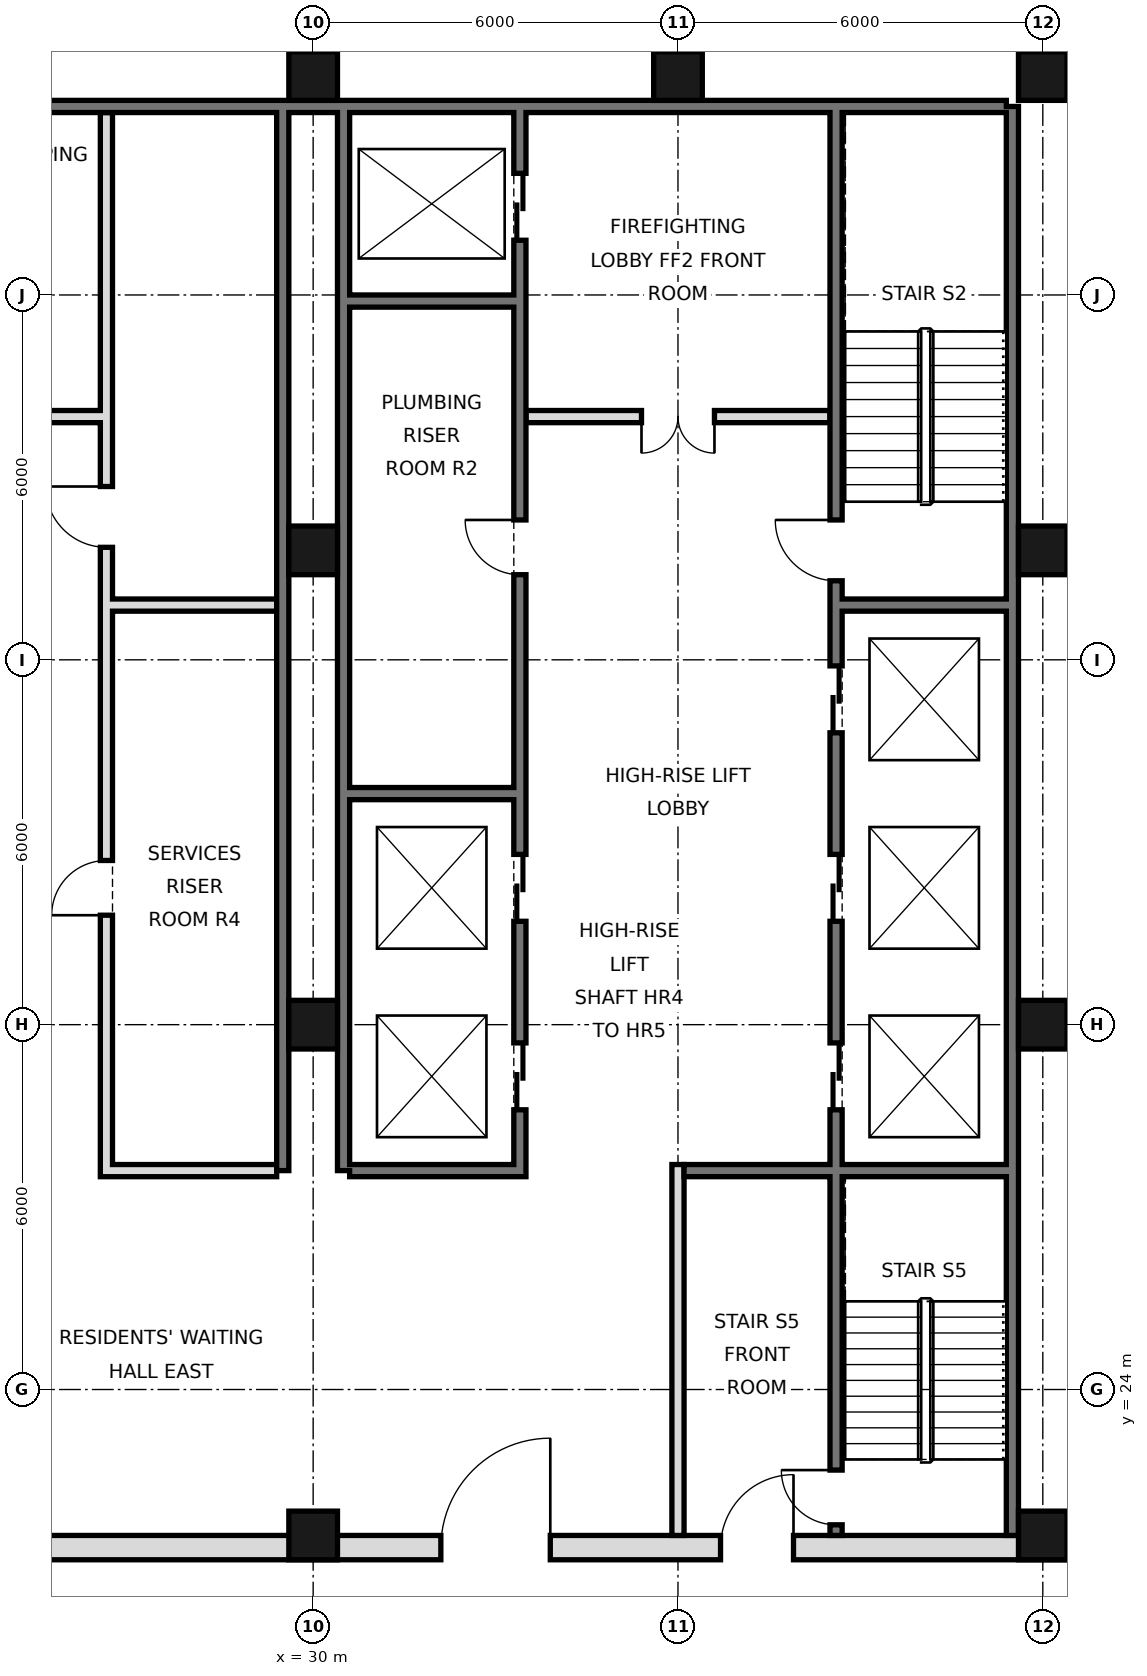
"""IFC4 building model, lengths in metres.
Left out: names, types, materials, properties, quantities, classifications, styles, units other than length and angle.
Written with IfcOpenShell. Run it as: python <this file> out.ifc"""

import sys

from ifc_helpers import new_model, si_unit, direction, frame, frame_2d, origin, origin_2d, place, context, subcontext, project, spatial, rectangle, hollow_rectangle, extrude, element, fill, save


model = new_model("IFC4")
c1 = context("Model", 3, precision=1e-05, world=origin(), true_north=direction((0.0, 1.0)))
c2 = subcontext(c1, "Body", "Model", "MODEL_VIEW")
j1 = project(units=[si_unit("LENGTHUNIT", "METRE"), si_unit("PLANEANGLEUNIT", "RADIAN")], contexts=[c1])
p1 = place(None, origin())
s1 = spatial("IfcSite", under=j1, at=p1, CompositionType="ELEMENT")
p2 = place(p1, origin())
s2 = spatial("IfcBuilding", under=s1, at=p2, CompositionType="ELEMENT")
p3 = place(p2, frame((0.0, 0.0, 170.8)))
s3 = spatial("IfcBuildingStorey", under=s2, at=p3, CompositionType="ELEMENT", Elevation=170.8)
for number, where, z_axis, x_axis in (
    (1, (30.0, 21.6, 0.0), (0.0, 0.0, 1.0), (1.0, 0.0, 0.0)),
    (2, (30.0, 30.0, 0.0), (0.0, 0.0, 1.0), (1.0, 0.0, 0.0)),
    (3, (30.0, 37.8, 0.0), (0.0, 0.0, 1.0), (1.0, 0.0, 0.0)),
    (4, (30.0, 45.6, 0.0), (0.0, 0.0, 1.0), (1.0, 0.0, 0.0)),
    (5, (36.0, 45.6, 0.0), (0.0, 0.0, 1.0), (1.0, 0.0, 0.0)),
    (6, (42.0, 21.6, 0.0), (0.0, 0.0, 1.0), (1.0, 0.0, 0.0)),
    (7, (42.0, 30.0, 0.0), (0.0, 0.0, 1.0), (1.0, 0.0, 0.0)),
    (8, (42.0, 37.8, 0.0), (0.0, 0.0, 1.0), (1.0, 0.0, 0.0)),
    (9, (42.0, 45.6, 0.0), (0.0, 0.0, 1.0), (1.0, 0.0, 0.0)),
):
    element("IfcColumn", number, at=place(p3, frame(where, z_axis=z_axis, x_axis=x_axis)), inside=s3, PredefinedType="COLUMN", context=c2, shape_type="SweptSolid", body=[
        extrude(hollow_rectangle(XDim=0.8, YDim=0.8, WallThickness=0.045, at=origin_2d()), origin(), (0.0, 0.0, 1.0), 3.6),
    ])
p4 = place(p3, frame((41.5, 21.6, 0.0), z_axis=(0.0, 0.0, 1.0), x_axis=(0.0, 1.0, 0.0)))
e10 = element("IfcWall", 10, at=p4, inside=s3, PredefinedType="SOLIDWALL", context=c2, shape_type="SweptSolid", body=[
    extrude(rectangle(XDim=23.5, YDim=0.2, at=frame_2d((11.75, 0.0))), origin(), (0.0, 0.0, 1.0), 3.42),
])
p5 = place(p3, frame((6.6, 45.1, 0.0), z_axis=(0.0, 0.0, 1.0), x_axis=(1.0, 0.0, 0.0)))
e11 = element("IfcWall", 11, at=p5, inside=s3, PredefinedType="SOLIDWALL", context=c2, shape_type="SweptSolid", body=[
    extrude(rectangle(XDim=34.8, YDim=0.2, at=frame_2d((17.4, 0.0))), origin(), (0.0, 0.0, 1.0), 3.42),
])
for number, where, z_axis, x_axis in (
    (12, (29.5, 27.6, 0.0), (0.0, 0.0, 1.0), (0.0, 1.0, 0.0)),
    (13, (30.5, 27.6, 0.0), (0.0, 0.0, 1.0), (0.0, 1.0, 0.0)),
):
    element("IfcWall", number, at=place(p3, frame(where, z_axis=z_axis, x_axis=x_axis)), inside=s3, PredefinedType="SOLIDWALL", context=c2, shape_type="SweptSolid", body=[
        extrude(rectangle(XDim=17.5, YDim=0.2, at=frame_2d((8.75, 0.0))), origin(), (0.0, 0.0, 1.0), 3.42),
    ])
p6 = place(p3, frame((5.6, 21.4, 0.0), z_axis=(0.0, 0.0, 1.0), x_axis=(1.0, 0.0, 0.0)))
e14 = element("IfcWall", 14, at=p6, inside=s3, PredefinedType="SOLIDWALL", context=c2, shape_type="SweptSolid", body=[
    extrude(rectangle(XDim=36.8, YDim=0.4, at=frame_2d((18.4, 0.0))), origin(), (0.0, 0.0, 1.0), 3.42),
])
p7 = place(p6, frame((8.5, 0.0, 0.0)))
e15 = element("IfcOpeningElement", 15, at=p7, cuts=e14, PredefinedType="OPENING", context=c2, shape_type="SweptSolid", body=[
    extrude(rectangle(XDim=1.8, YDim=2.1, at=frame_2d((0.9, 1.05))), frame((0.0, 0.21, 0.0), z_axis=(0.0, -1.0, 0.0), x_axis=(1.0, 0.0, 0.0)), (0.0, 0.0, 1.0), 0.42),
])
p8 = place(p6, frame((17.5, 0.0, 0.0)))
e16 = element("IfcOpeningElement", 16, at=p8, cuts=e14, PredefinedType="OPENING", context=c2, shape_type="SweptSolid", body=[
    extrude(rectangle(XDim=1.8, YDim=2.1, at=frame_2d((0.9, 1.05))), frame((0.0, 0.21, 0.0), z_axis=(0.0, -1.0, 0.0), x_axis=(1.0, 0.0, 0.0)), (0.0, 0.0, 1.0), 0.42),
])
p9 = place(p6, frame((26.5, 0.0, 0.0)))
e17 = element("IfcOpeningElement", 17, at=p9, cuts=e14, PredefinedType="OPENING", context=c2, shape_type="SweptSolid", body=[
    extrude(rectangle(XDim=1.8, YDim=2.1, at=frame_2d((0.9, 1.05))), frame((0.0, 0.21, 0.0), z_axis=(0.0, -1.0, 0.0), x_axis=(1.0, 0.0, 0.0)), (0.0, 0.0, 1.0), 0.42),
])
p10 = place(p6, frame((4.5, 0.0, 0.0)))
e18 = element("IfcOpeningElement", 18, at=p10, cuts=e14, PredefinedType="OPENING", context=c2, shape_type="SweptSolid", body=[
    extrude(rectangle(XDim=1.2, YDim=2.1, at=frame_2d((0.6, 1.05))), frame((0.0, 0.21, 0.0), z_axis=(0.0, -1.0, 0.0), x_axis=(1.0, 0.0, 0.0)), (0.0, 0.0, 1.0), 0.42),
])
p11 = place(p6, frame((31.1, 0.0, 0.0)))
e19 = element("IfcOpeningElement", 19, at=p11, cuts=e14, PredefinedType="OPENING", context=c2, shape_type="SweptSolid", body=[
    extrude(rectangle(XDim=1.2, YDim=2.1, at=frame_2d((0.6, 1.05))), frame((0.0, 0.21, 0.0), z_axis=(0.0, -1.0, 0.0), x_axis=(1.0, 0.0, 0.0)), (0.0, 0.0, 1.0), 0.42),
])
p12 = place(p3, frame((26.6, 27.5, 0.0), z_axis=(0.0, 0.0, 1.0), x_axis=(0.0, 1.0, 0.0)))
e20 = element("IfcWall", 20, at=p12, inside=s3, PredefinedType="SOLIDWALL", context=c2, shape_type="SweptSolid", body=[
    extrude(rectangle(XDim=17.5, YDim=0.2, at=frame_2d((8.75, 0.0))), origin(), (0.0, 0.0, 1.0), 3.42),
])
p13 = place(p12, frame((4.3, 0.0, 0.0)))
e21 = element("IfcOpeningElement", 21, at=p13, cuts=e20, PredefinedType="OPENING", context=c2, shape_type="SweptSolid", body=[
    extrude(rectangle(XDim=0.9, YDim=2.1, at=frame_2d((0.45, 1.05))), frame((0.0, 0.11, 0.0), z_axis=(0.0, -1.0, 0.0), x_axis=(1.0, 0.0, 0.0)), (0.0, 0.0, 1.0), 0.22),
])
p14 = place(p12, frame((10.35, 0.0, 0.0)))
e22 = element("IfcOpeningElement", 22, at=p14, cuts=e20, PredefinedType="OPENING", context=c2, shape_type="SweptSolid", body=[
    extrude(rectangle(XDim=1.0, YDim=2.1, at=frame_2d((0.5, 1.05))), frame((0.0, 0.11, 0.0), z_axis=(0.0, -1.0, 0.0), x_axis=(1.0, 0.0, 0.0)), (0.0, 0.0, 1.0), 0.22),
])
p15 = place(p3, frame((33.4, 27.5, 0.0), z_axis=(0.0, 0.0, 1.0), x_axis=(0.0, 1.0, 0.0)))
e23 = element("IfcWall", 23, at=p15, inside=s3, PredefinedType="SOLIDWALL", context=c2, shape_type="SweptSolid", body=[
    extrude(rectangle(XDim=17.5, YDim=0.2, at=frame_2d((8.75, 0.0))), origin(), (0.0, 0.0, 1.0), 3.42),
])
p16 = place(p15, frame((1.1, 0.0, 0.0)))
e24 = element("IfcOpeningElement", 24, at=p16, cuts=e23, PredefinedType="OPENING", context=c2, shape_type="SweptSolid", body=[
    extrude(rectangle(XDim=1.1, YDim=2.1, at=frame_2d((0.55, 1.05))), frame((0.0, 0.11, 0.0), z_axis=(0.0, -1.0, 0.0), x_axis=(1.0, 0.0, 0.0)), (0.0, 0.0, 1.0), 0.22),
])
p17 = place(p15, frame((4.2, 0.0, 0.0)))
e25 = element("IfcOpeningElement", 25, at=p17, cuts=e23, PredefinedType="OPENING", context=c2, shape_type="SweptSolid", body=[
    extrude(rectangle(XDim=1.1, YDim=2.1, at=frame_2d((0.55, 1.05))), frame((0.0, 0.11, 0.0), z_axis=(0.0, -1.0, 0.0), x_axis=(1.0, 0.0, 0.0)), (0.0, 0.0, 1.0), 0.22),
])
p18 = place(p15, frame((15.4, 0.0, 0.0)))
e26 = element("IfcOpeningElement", 26, at=p18, cuts=e23, PredefinedType="OPENING", context=c2, shape_type="SweptSolid", body=[
    extrude(rectangle(XDim=1.1, YDim=2.1, at=frame_2d((0.55, 1.05))), frame((0.0, 0.11, 0.0), z_axis=(0.0, -1.0, 0.0), x_axis=(1.0, 0.0, 0.0)), (0.0, 0.0, 1.0), 0.22),
])
p19 = place(p15, frame((9.9, 0.0, 0.0)))
e27 = element("IfcOpeningElement", 27, at=p19, cuts=e23, PredefinedType="OPENING", context=c2, shape_type="SweptSolid", body=[
    extrude(rectangle(XDim=0.9, YDim=2.1, at=frame_2d((0.45, 1.05))), frame((0.0, 0.11, 0.0), z_axis=(0.0, -1.0, 0.0), x_axis=(1.0, 0.0, 0.0)), (0.0, 0.0, 1.0), 0.22),
])
p20 = place(p3, frame((36.0, 21.6, 0.0), z_axis=(0.0, 0.0, 1.0), x_axis=(0.0, 1.0, 0.0)))
e28 = element("IfcWall", 28, at=p20, inside=s3, PredefinedType="PARTITIONING", context=c2, shape_type="SweptSolid", body=[
    extrude(rectangle(XDim=6.1, YDim=0.2, at=frame_2d((3.05, 0.0))), origin(), (0.0, 0.0, 1.0), 3.42),
])
p21 = place(p3, frame((38.6, 21.6, 0.0), z_axis=(0.0, 0.0, 1.0), x_axis=(0.0, 1.0, 0.0)))
e29 = element("IfcWall", 29, at=p21, inside=s3, PredefinedType="SOLIDWALL", context=c2, shape_type="SweptSolid", body=[
    extrude(rectangle(XDim=23.4, YDim=0.2, at=frame_2d((11.7, 0.0))), origin(), (0.0, 0.0, 1.0), 3.42),
])
p22 = place(p21, frame((7.0, 0.0, 0.0)))
e30 = element("IfcOpeningElement", 30, at=p22, cuts=e29, PredefinedType="OPENING", context=c2, shape_type="SweptSolid", body=[
    extrude(rectangle(XDim=1.1, YDim=2.1, at=frame_2d((0.55, 1.05))), frame((0.0, 0.11, 0.0), z_axis=(0.0, -1.0, 0.0), x_axis=(1.0, 0.0, 0.0)), (0.0, 0.0, 1.0), 0.22),
])
p23 = place(p21, frame((10.1, 0.0, 0.0)))
e31 = element("IfcOpeningElement", 31, at=p23, cuts=e29, PredefinedType="OPENING", context=c2, shape_type="SweptSolid", body=[
    extrude(rectangle(XDim=1.1, YDim=2.1, at=frame_2d((0.55, 1.05))), frame((0.0, 0.11, 0.0), z_axis=(0.0, -1.0, 0.0), x_axis=(1.0, 0.0, 0.0)), (0.0, 0.0, 1.0), 0.22),
])
p24 = place(p21, frame((13.2, 0.0, 0.0)))
e32 = element("IfcOpeningElement", 32, at=p24, cuts=e29, PredefinedType="OPENING", context=c2, shape_type="SweptSolid", body=[
    extrude(rectangle(XDim=1.1, YDim=2.1, at=frame_2d((0.55, 1.05))), frame((0.0, 0.11, 0.0), z_axis=(0.0, -1.0, 0.0), x_axis=(1.0, 0.0, 0.0)), (0.0, 0.0, 1.0), 0.22),
])
p25 = place(p21, frame((15.7, 0.0, 0.0)))
e33 = element("IfcOpeningElement", 33, at=p25, cuts=e29, PredefinedType="OPENING", context=c2, shape_type="SweptSolid", body=[
    extrude(rectangle(XDim=1.0, YDim=2.1, at=frame_2d((0.5, 1.05))), frame((0.0, 0.11, 0.0), z_axis=(0.0, -1.0, 0.0), x_axis=(1.0, 0.0, 0.0)), (0.0, 0.0, 1.0), 0.22),
])
p26 = place(p21, frame((0.175, 0.0, 0.0)))
e34 = element("IfcOpeningElement", 34, at=p26, cuts=e29, PredefinedType="OPENING", context=c2, shape_type="SweptSolid", body=[
    extrude(rectangle(XDim=0.9, YDim=2.1, at=frame_2d((0.45, 1.05))), frame((0.0, 0.11, 0.0), z_axis=(0.0, -1.0, 0.0), x_axis=(1.0, 0.0, 0.0)), (0.0, 0.0, 1.0), 0.22),
])
for number, where, z_axis, x_axis in (
    (35, (26.7, 27.6, 0.0), (0.0, 0.0, 1.0), (1.0, 0.0, 0.0)),
    (36, (30.6, 27.6, 0.0), (0.0, 0.0, 1.0), (1.0, 0.0, 0.0)),
):
    element("IfcWall", number, at=place(p3, frame(where, z_axis=z_axis, x_axis=x_axis)), inside=s3, PredefinedType="SOLIDWALL", context=c2, shape_type="SweptSolid", body=[
        extrude(rectangle(XDim=2.7, YDim=0.2, at=frame_2d((1.35, 0.0))), origin(), (0.0, 0.0, 1.0), 3.42),
    ])
p27 = place(p3, frame((36.1, 27.6, 0.0), z_axis=(0.0, 0.0, 1.0), x_axis=(1.0, 0.0, 0.0)))
e37 = element("IfcWall", 37, at=p27, inside=s3, PredefinedType="SOLIDWALL", context=c2, shape_type="SweptSolid", body=[
    extrude(rectangle(XDim=5.3, YDim=0.2, at=frame_2d((2.65, 0.0))), origin(), (0.0, 0.0, 1.0), 3.42),
])
for number, where, z_axis, x_axis in (
    (38, (30.6, 33.8, 0.0), (0.0, 0.0, 1.0), (1.0, 0.0, 0.0)),
    (39, (26.7, 36.9, 0.0), (0.0, 0.0, 1.0), (1.0, 0.0, 0.0)),
    (40, (38.7, 36.9, 0.0), (0.0, 0.0, 1.0), (1.0, 0.0, 0.0)),
):
    element("IfcWall", number, at=place(p3, frame(where, z_axis=z_axis, x_axis=x_axis)), inside=s3, PredefinedType="SOLIDWALL", context=c2, shape_type="SweptSolid", body=[
        extrude(rectangle(XDim=2.7, YDim=0.2, at=frame_2d((1.35, 0.0))), origin(), (0.0, 0.0, 1.0), 3.42),
    ])
p28 = place(p3, frame((21.5, 40.0, 0.0), z_axis=(0.0, 0.0, 1.0), x_axis=(1.0, 0.0, 0.0)))
e41 = element("IfcWall", 41, at=p28, inside=s3, PredefinedType="PARTITIONING", context=c2, shape_type="SweptSolid", body=[
    extrude(rectangle(XDim=5.0, YDim=0.2, at=frame_2d((2.5, 0.0))), origin(), (0.0, 0.0, 1.0), 3.42),
])
p29 = place(p28, frame((1.9, 0.0, 0.0)))
e42 = element("IfcOpeningElement", 42, at=p29, cuts=e41, PredefinedType="OPENING", context=c2, shape_type="SweptSolid", body=[
    extrude(rectangle(XDim=1.2, YDim=2.1, at=frame_2d((0.6, 1.05))), frame((0.0, 0.11, 0.0), z_axis=(0.0, -1.0, 0.0), x_axis=(1.0, 0.0, 0.0)), (0.0, 0.0, 1.0), 0.22),
])
p30 = place(p3, frame((33.5, 40.0, 0.0), z_axis=(0.0, 0.0, 1.0), x_axis=(1.0, 0.0, 0.0)))
e43 = element("IfcWall", 43, at=p30, inside=s3, PredefinedType="PARTITIONING", context=c2, shape_type="SweptSolid", body=[
    extrude(rectangle(XDim=5.0, YDim=0.2, at=frame_2d((2.5, 0.0))), origin(), (0.0, 0.0, 1.0), 3.42),
])
p31 = place(p30, frame((1.9, 0.0, 0.0)))
e44 = element("IfcOpeningElement", 44, at=p31, cuts=e43, PredefinedType="OPENING", context=c2, shape_type="SweptSolid", body=[
    extrude(rectangle(XDim=1.2, YDim=2.1, at=frame_2d((0.6, 1.05))), frame((0.0, 0.11, 0.0), z_axis=(0.0, -1.0, 0.0), x_axis=(1.0, 0.0, 0.0)), (0.0, 0.0, 1.0), 0.22),
])
p32 = place(p3, frame((30.6, 41.9, 0.0), z_axis=(0.0, 0.0, 1.0), x_axis=(1.0, 0.0, 0.0)))
e45 = element("IfcWall", 45, at=p32, inside=s3, PredefinedType="SOLIDWALL", context=c2, shape_type="SweptSolid", body=[
    extrude(rectangle(XDim=2.7, YDim=0.2, at=frame_2d((1.35, 0.0))), origin(), (0.0, 0.0, 1.0), 3.42),
])
p33 = place(p9, frame((1.8, 0.0, 0.0), z_axis=(0.0, 0.0, 1.0), x_axis=(-1.0, 0.0, 0.0)))
e46 = element("IfcDoor", 46, at=p33, inside=s3, OperationType="SINGLE_SWING_LEFT", PredefinedType="DOOR", context=c2, shape_type="SweptSolid", body=[
    extrude(rectangle(XDim=1.8, YDim=2.1, at=frame_2d((0.9, 1.05))), frame((0.0, 0.025, 0.0), z_axis=(0.0, -1.0, 0.0), x_axis=(1.0, 0.0, 0.0)), (0.0, 0.0, 1.0), 0.05),
])
fill(e17, e46)
p34 = place(p11, frame((1.2, 0.0, 0.0), z_axis=(0.0, 0.0, 1.0), x_axis=(-1.0, 0.0, 0.0)))
e47 = element("IfcDoor", 47, at=p34, inside=s3, OperationType="SINGLE_SWING_LEFT", PredefinedType="DOOR", context=c2, shape_type="SweptSolid", body=[
    extrude(rectangle(XDim=1.2, YDim=2.1, at=frame_2d((0.6, 1.05))), frame((0.0, 0.025, 0.0), z_axis=(0.0, -1.0, 0.0), x_axis=(1.0, 0.0, 0.0)), (0.0, 0.0, 1.0), 0.05),
])
fill(e19, e47)
p35 = place(p31, frame((1.2, 0.0, 0.0), z_axis=(0.0, 0.0, 1.0), x_axis=(-1.0, 0.0, 0.0)))
e48 = element("IfcDoor", 48, at=p35, inside=s3, OperationType="DOUBLE_DOOR_SINGLE_SWING", PredefinedType="DOOR", context=c2, shape_type="SweptSolid", body=[
    extrude(rectangle(XDim=1.2, YDim=2.1, at=frame_2d((0.6, 1.05))), frame((0.0, 0.025, 0.0), z_axis=(0.0, -1.0, 0.0), x_axis=(1.0, 0.0, 0.0)), (0.0, 0.0, 1.0), 0.05),
])
fill(e44, e48)
p36 = place(p22, origin())
e49 = element("IfcDoor", 49, at=p36, inside=s3, OperationType="DOUBLE_DOOR_SLIDING", PredefinedType="DOOR", context=c2, shape_type="SweptSolid", body=[
    extrude(rectangle(XDim=1.1, YDim=2.1, at=frame_2d((0.55, 1.05))), frame((0.0, 0.025, 0.0), z_axis=(0.0, -1.0, 0.0), x_axis=(1.0, 0.0, 0.0)), (0.0, 0.0, 1.0), 0.05),
])
fill(e30, e49)
p37 = place(p23, origin())
e50 = element("IfcDoor", 50, at=p37, inside=s3, OperationType="DOUBLE_DOOR_SLIDING", PredefinedType="DOOR", context=c2, shape_type="SweptSolid", body=[
    extrude(rectangle(XDim=1.1, YDim=2.1, at=frame_2d((0.55, 1.05))), frame((0.0, 0.025, 0.0), z_axis=(0.0, -1.0, 0.0), x_axis=(1.0, 0.0, 0.0)), (0.0, 0.0, 1.0), 0.05),
])
fill(e31, e50)
p38 = place(p24, origin())
e51 = element("IfcDoor", 51, at=p38, inside=s3, OperationType="DOUBLE_DOOR_SLIDING", PredefinedType="DOOR", context=c2, shape_type="SweptSolid", body=[
    extrude(rectangle(XDim=1.1, YDim=2.1, at=frame_2d((0.55, 1.05))), frame((0.0, 0.025, 0.0), z_axis=(0.0, -1.0, 0.0), x_axis=(1.0, 0.0, 0.0)), (0.0, 0.0, 1.0), 0.05),
])
fill(e32, e51)
p39 = place(p16, origin())
e52 = element("IfcDoor", 52, at=p39, inside=s3, OperationType="DOUBLE_DOOR_SLIDING", PredefinedType="DOOR", context=c2, shape_type="SweptSolid", body=[
    extrude(rectangle(XDim=1.1, YDim=2.1, at=frame_2d((0.55, 1.05))), frame((0.0, 0.025, 0.0), z_axis=(0.0, -1.0, 0.0), x_axis=(1.0, 0.0, 0.0)), (0.0, 0.0, 1.0), 0.05),
])
fill(e24, e52)
p40 = place(p17, origin())
e53 = element("IfcDoor", 53, at=p40, inside=s3, OperationType="DOUBLE_DOOR_SLIDING", PredefinedType="DOOR", context=c2, shape_type="SweptSolid", body=[
    extrude(rectangle(XDim=1.1, YDim=2.1, at=frame_2d((0.55, 1.05))), frame((0.0, 0.025, 0.0), z_axis=(0.0, -1.0, 0.0), x_axis=(1.0, 0.0, 0.0)), (0.0, 0.0, 1.0), 0.05),
])
fill(e25, e53)
p41 = place(p18, origin())
e54 = element("IfcDoor", 54, at=p41, inside=s3, OperationType="DOUBLE_DOOR_SLIDING", PredefinedType="DOOR", context=c2, shape_type="SweptSolid", body=[
    extrude(rectangle(XDim=1.1, YDim=2.1, at=frame_2d((0.55, 1.05))), frame((0.0, 0.025, 0.0), z_axis=(0.0, -1.0, 0.0), x_axis=(1.0, 0.0, 0.0)), (0.0, 0.0, 1.0), 0.05),
])
fill(e26, e54)
p42 = place(p25, frame((1.0, 0.0, 0.0), z_axis=(0.0, 0.0, 1.0), x_axis=(-1.0, 0.0, 0.0)))
e55 = element("IfcDoor", 55, at=p42, inside=s3, OperationType="SINGLE_SWING_LEFT", PredefinedType="DOOR", context=c2, shape_type="SweptSolid", body=[
    extrude(rectangle(XDim=1.0, YDim=2.1, at=frame_2d((0.5, 1.05))), frame((0.0, 0.025, 0.0), z_axis=(0.0, -1.0, 0.0), x_axis=(1.0, 0.0, 0.0)), (0.0, 0.0, 1.0), 0.05),
])
fill(e33, e55)
p43 = place(p26, frame((0.9, 0.0, 0.0), z_axis=(0.0, 0.0, 1.0), x_axis=(-1.0, 0.0, 0.0)))
e56 = element("IfcDoor", 56, at=p43, inside=s3, OperationType="SINGLE_SWING_LEFT", PredefinedType="DOOR", context=c2, shape_type="SweptSolid", body=[
    extrude(rectangle(XDim=0.9, YDim=2.1, at=frame_2d((0.45, 1.05))), frame((0.0, 0.025, 0.0), z_axis=(0.0, -1.0, 0.0), x_axis=(1.0, 0.0, 0.0)), (0.0, 0.0, 1.0), 0.05),
])
fill(e34, e56)
p44 = place(p19, frame((0.9, 0.0, 0.0), z_axis=(0.0, 0.0, 1.0), x_axis=(-1.0, 0.0, 0.0)))
e57 = element("IfcDoor", 57, at=p44, inside=s3, OperationType="SINGLE_SWING_LEFT", PredefinedType="DOOR", context=c2, shape_type="SweptSolid", body=[
    extrude(rectangle(XDim=0.9, YDim=2.1, at=frame_2d((0.45, 1.05))), frame((0.0, 0.025, 0.0), z_axis=(0.0, -1.0, 0.0), x_axis=(1.0, 0.0, 0.0)), (0.0, 0.0, 1.0), 0.05),
])
fill(e27, e57)
p45 = place(p13, origin())
e58 = element("IfcDoor", 58, at=p45, inside=s3, OperationType="SINGLE_SWING_LEFT", PredefinedType="DOOR", context=c2, shape_type="SweptSolid", body=[
    extrude(rectangle(XDim=0.9, YDim=2.1, at=frame_2d((0.45, 1.05))), frame((0.0, 0.025, 0.0), z_axis=(0.0, -1.0, 0.0), x_axis=(1.0, 0.0, 0.0)), (0.0, 0.0, 1.0), 0.05),
])
fill(e21, e58)
p46 = place(p14, frame((1.0, 0.0, 0.0), z_axis=(0.0, 0.0, 1.0), x_axis=(-1.0, 0.0, 0.0)))
e59 = element("IfcDoor", 59, at=p46, inside=s3, OperationType="SINGLE_SWING_LEFT", PredefinedType="DOOR", context=c2, shape_type="SweptSolid", body=[
    extrude(rectangle(XDim=1.0, YDim=2.1, at=frame_2d((0.5, 1.05))), frame((0.0, 0.025, 0.0), z_axis=(0.0, -1.0, 0.0), x_axis=(1.0, 0.0, 0.0)), (0.0, 0.0, 1.0), 0.05),
])
fill(e22, e59)
save(model, sys.argv[1])
